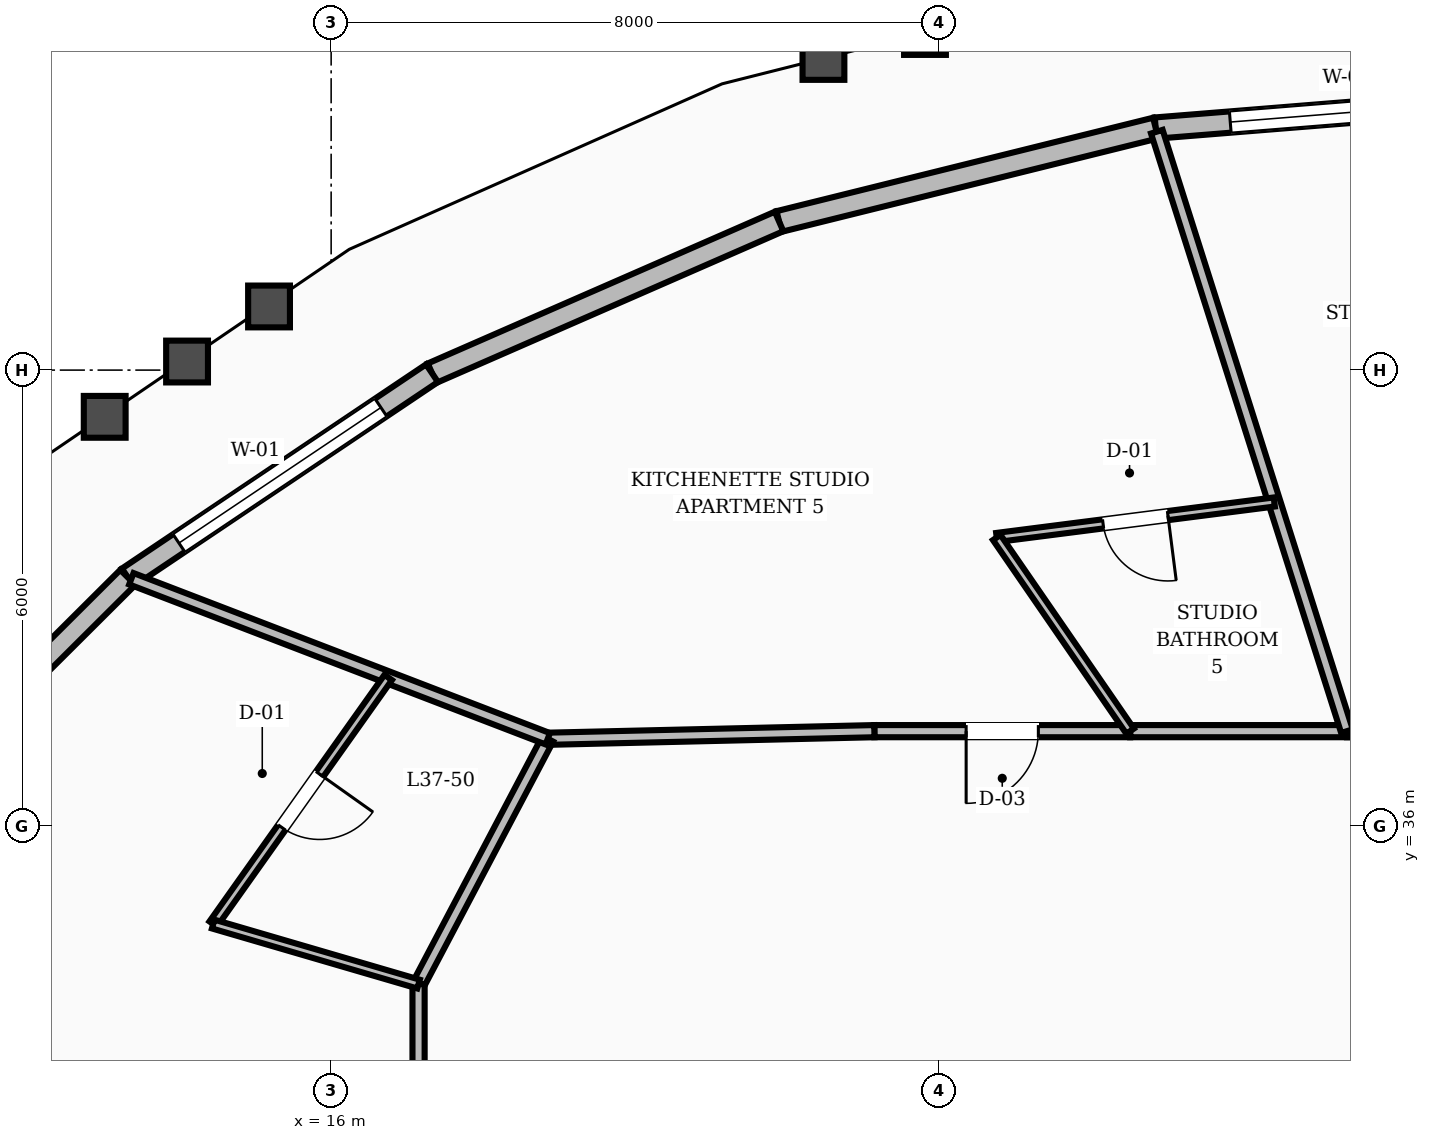
"""IFC4 building model, lengths in metres.
Left out: names, types, materials, properties, quantities, classifications, styles, units other than length and angle.
Written with IfcOpenShell. Run it as: python <this file> out.ifc"""

import sys

from ifc_helpers import new_model, si_unit, direction, frame, frame_2d, origin, place, context, subcontext, project, spatial, rectangle, extrude, element, fill, save


model = new_model("IFC4")
c1 = context("Model", 3, precision=1e-05, world=origin(), true_north=direction((0.0, 1.0)))
c2 = subcontext(c1, "Body", "Model", "MODEL_VIEW")
j1 = project(units=[si_unit("LENGTHUNIT", "METRE"), si_unit("PLANEANGLEUNIT", "RADIAN")], contexts=[c1])
p1 = place(None, origin())
s1 = spatial("IfcSite", under=j1, at=p1, CompositionType="ELEMENT")
p2 = place(p1, origin())
s2 = spatial("IfcBuilding", under=s1, at=p2, CompositionType="ELEMENT")
p3 = place(p2, frame((0.0, 0.0, 146.0)))
s3 = spatial("IfcBuildingStorey", under=s2, at=p3, CompositionType="ELEMENT", Elevation=146.0)
p4 = place(p3, frame((32.0, 45.599, 0.0), z_axis=(0.0, 0.0, 1.0), x_axis=(-0.996771275463, -0.080293364684, 0.0)))
e1 = element("IfcWall", 1, at=p4, inside=s3, PredefinedType="STANDARD", context=c2, shape_type="SweptSolid", body=[
    extrude(rectangle(XDim=5.169, YDim=0.28, at=frame_2d((2.584, 0.0))), origin(), (0.0, 0.0, 1.0), 2.82),
])
p5 = place(p4, frame((0.985, 0.0, 0.8)))
e2 = element("IfcOpeningElement", 2, at=p5, cuts=e1, PredefinedType="OPENING", context=c2, shape_type="SweptSolid", body=[
    extrude(rectangle(XDim=3.2, YDim=1.65, at=frame_2d((1.6, 0.825))), frame((0.0, 0.15, 0.0), z_axis=(0.0, -1.0, 0.0), x_axis=(1.0, 0.0, 0.0)), (0.0, 0.0, 1.0), 0.3),
])
p6 = place(p3, frame((26.848, 45.184, 0.0), z_axis=(0.0, 0.0, 1.0), x_axis=(-0.970574196652, -0.240802260774, 0.0)))
e3 = element("IfcWall", 3, at=p6, inside=s3, PredefinedType="STANDARD", context=c2, shape_type="SweptSolid", body=[
    extrude(rectangle(XDim=5.105, YDim=0.28, at=frame_2d((2.552, 0.0))), origin(), (0.0, 0.0, 1.0), 2.82),
])
p7 = place(p3, frame((21.893, 43.955, 0.0), z_axis=(0.0, 0.0, 1.0), x_axis=(-0.916285475586, -0.400525813438, 0.0)))
e4 = element("IfcWall", 4, at=p7, inside=s3, PredefinedType="STANDARD", context=c2, shape_type="SweptSolid", body=[
    extrude(rectangle(XDim=4.983, YDim=0.28, at=frame_2d((2.492, 0.0))), origin(), (0.0, 0.0, 1.0), 2.82),
])
p8 = place(p3, frame((17.327, 41.959, 0.0), z_axis=(0.0, 0.0, 1.0), x_axis=(-0.830308520581, -0.557304010977, 0.0)))
e5 = element("IfcWall", 5, at=p8, inside=s3, PredefinedType="STANDARD", context=c2, shape_type="SweptSolid", body=[
    extrude(rectangle(XDim=4.82, YDim=0.28, at=frame_2d((2.41, 0.0))), origin(), (0.0, 0.0, 1.0), 2.82),
])
p9 = place(p8, frame((0.81, 0.0, 0.8)))
e6 = element("IfcOpeningElement", 6, at=p9, cuts=e5, PredefinedType="OPENING", context=c2, shape_type="SweptSolid", body=[
    extrude(rectangle(XDim=3.2, YDim=1.65, at=frame_2d((1.6, 0.825))), frame((0.0, 0.15, 0.0), z_axis=(0.0, -1.0, 0.0), x_axis=(1.0, 0.0, 0.0)), (0.0, 0.0, 1.0), 0.3),
])
p10 = place(p3, frame((13.325, 39.273, 0.0), z_axis=(0.0, 0.0, 1.0), x_axis=(-0.708343047993, -0.70586834917, 0.0)))
e7 = element("IfcWall", 7, at=p10, inside=s3, PredefinedType="STANDARD", context=c2, shape_type="SweptSolid", body=[
    extrude(rectangle(XDim=4.637, YDim=0.28, at=frame_2d((2.318, 0.0))), origin(), (0.0, 0.0, 1.0), 2.82),
])
p11 = place(p3, frame((32.0, 37.25, 0.0), z_axis=(0.0, 0.0, 1.0), x_axis=(-1.0, 0.0, 0.0)))
e8 = element("IfcWall", 8, at=p11, inside=s3, PredefinedType="SOLIDWALL", context=c2, shape_type="SweptSolid", body=[
    extrude(rectangle(XDim=2.635, YDim=0.16, at=frame_2d((1.318, 0.0))), origin(), (0.0, 0.0, 1.0), 2.8),
])
p12 = place(p11, frame((0.843, 0.0, 0.0)))
e9 = element("IfcOpeningElement", 9, at=p12, cuts=e8, PredefinedType="OPENING", context=c2, shape_type="SweptSolid", body=[
    extrude(rectangle(XDim=0.95, YDim=2.1, at=frame_2d((0.475, 1.05))), frame((0.0, 0.09, 0.0), z_axis=(0.0, -1.0, 0.0), x_axis=(1.0, 0.0, 0.0)), (0.0, 0.0, 1.0), 0.18),
])
p13 = place(p3, frame((29.365, 37.25, 0.0), z_axis=(0.0, 0.0, 1.0), x_axis=(-1.0, 0.0, 0.0)))
e10 = element("IfcWall", 10, at=p13, inside=s3, PredefinedType="SOLIDWALL", context=c2, shape_type="SweptSolid", body=[
    extrude(rectangle(XDim=2.853, YDim=0.16, at=frame_2d((1.426, 0.0))), origin(), (0.0, 0.0, 1.0), 2.8),
])
p14 = place(p3, frame((26.512, 37.25, 0.0), z_axis=(0.0, 0.0, 1.0), x_axis=(-1.0, 0.0, 0.0)))
e11 = element("IfcWall", 11, at=p14, inside=s3, PredefinedType="SOLIDWALL", context=c2, shape_type="SweptSolid", body=[
    extrude(rectangle(XDim=3.365, YDim=0.16, at=frame_2d((1.683, 0.0))), origin(), (0.0, 0.0, 1.0), 2.8),
])
p15 = place(p14, frame((1.208, 0.0, 0.0)))
e12 = element("IfcOpeningElement", 12, at=p15, cuts=e11, PredefinedType="OPENING", context=c2, shape_type="SweptSolid", body=[
    extrude(rectangle(XDim=0.95, YDim=2.1, at=frame_2d((0.475, 1.05))), frame((0.0, 0.09, 0.0), z_axis=(0.0, -1.0, 0.0), x_axis=(1.0, 0.0, 0.0)), (0.0, 0.0, 1.0), 0.18),
])
p16 = place(p3, frame((23.146, 37.25, 0.0), z_axis=(0.0, 0.0, 1.0), x_axis=(-0.999728709658, -0.023291781507, 0.0)))
e13 = element("IfcWall", 13, at=p16, inside=s3, PredefinedType="SOLIDWALL", context=c2, shape_type="SweptSolid", body=[
    extrude(rectangle(XDim=4.298, YDim=0.16, at=frame_2d((2.149, 0.0))), origin(), (0.0, 0.0, 1.0), 2.8),
])
p17 = place(p3, frame((18.85, 37.15, 0.0), z_axis=(0.0, 0.0, 1.0), x_axis=(-0.466093963429, -0.884735224378, 0.0)))
e14 = element("IfcWall", 14, at=p17, inside=s3, PredefinedType="SOLIDWALL", context=c2, shape_type="SweptSolid", body=[
    extrude(rectangle(XDim=3.648, YDim=0.16, at=frame_2d((1.824, 0.0))), origin(), (0.0, 0.0, 1.0), 2.8),
])
p18 = place(p3, frame((17.15, 33.923, 0.0), z_axis=(0.0, 0.0, 1.0), x_axis=(0.0, -1.0, 0.0)))
e15 = element("IfcWall", 15, at=p18, inside=s3, PredefinedType="SOLIDWALL", context=c2, shape_type="SweptSolid", body=[
    extrude(rectangle(XDim=3.771, YDim=0.16, at=frame_2d((1.886, 0.0))), origin(), (0.0, 0.0, 1.0), 2.8),
])
p19 = place(p18, frame((1.411, 0.0, 0.0)))
e16 = element("IfcOpeningElement", 16, at=p19, cuts=e15, PredefinedType="OPENING", context=c2, shape_type="SweptSolid", body=[
    extrude(rectangle(XDim=0.95, YDim=2.1, at=frame_2d((0.475, 1.05))), frame((0.0, 0.09, 0.0), z_axis=(0.0, -1.0, 0.0), x_axis=(1.0, 0.0, 0.0)), (0.0, 0.0, 1.0), 0.18),
])
p20 = place(p3, frame((29.365, 37.25, 0.0), z_axis=(0.0, 0.0, 1.0), x_axis=(-0.302358297893, 0.953194345186, 0.0)))
e17 = element("IfcWall", 17, at=p20, inside=s3, PredefinedType="SOLIDWALL", context=c2, shape_type="SweptSolid", body=[
    extrude(rectangle(XDim=8.274, YDim=0.16, at=frame_2d((4.137, 0.0))), origin(), (0.0, 0.0, 1.0), 2.8),
])
p21 = place(p3, frame((28.408, 40.265, 0.0), z_axis=(0.0, 0.0, 1.0), x_axis=(-0.991927075006, -0.126809612691, 0.0)))
e18 = element("IfcWall", 18, at=p21, inside=s3, PredefinedType="PARTITIONING", context=c2, shape_type="SweptSolid", body=[
    extrude(rectangle(XDim=3.681, YDim=0.12, at=frame_2d((1.841, 0.0))), origin(), (0.0, 0.0, 1.0), 2.8),
])
p22 = place(p21, frame((1.41, 0.0, 0.0)))
e19 = element("IfcOpeningElement", 19, at=p22, cuts=e18, PredefinedType="OPENING", context=c2, shape_type="SweptSolid", body=[
    extrude(rectangle(XDim=0.86, YDim=2.1, at=frame_2d((0.43, 1.05))), frame((0.0, 0.07, 0.0), z_axis=(0.0, -1.0, 0.0), x_axis=(1.0, 0.0, 0.0)), (0.0, 0.0, 1.0), 0.14),
])
p23 = place(p3, frame((26.512, 37.25, 0.0), z_axis=(0.0, 0.0, 1.0), x_axis=(-0.567255291352, 0.823542005263, 0.0)))
e20 = element("IfcWall", 20, at=p23, inside=s3, PredefinedType="PARTITIONING", context=c2, shape_type="SweptSolid", body=[
    extrude(rectangle(XDim=3.094, YDim=0.12, at=frame_2d((1.547, 0.0))), origin(), (0.0, 0.0, 1.0), 2.8),
])
p24 = place(p3, frame((18.85, 37.15, 0.0), z_axis=(0.0, 0.0, 1.0), x_axis=(-0.933453846584, 0.358697527589, 0.0)))
e21 = element("IfcWall", 21, at=p24, inside=s3, PredefinedType="SOLIDWALL", context=c2, shape_type="SweptSolid", body=[
    extrude(rectangle(XDim=5.869, YDim=0.16, at=frame_2d((2.935, 0.0))), origin(), (0.0, 0.0, 1.0), 2.8),
])
p25 = place(p3, frame((16.75, 37.957, 0.0), z_axis=(0.0, 0.0, 1.0), x_axis=(-0.57861140021, -0.81560336411, 0.0)))
e22 = element("IfcWall", 22, at=p25, inside=s3, PredefinedType="PARTITIONING", context=c2, shape_type="SweptSolid", body=[
    extrude(rectangle(XDim=3.979, YDim=0.12, at=frame_2d((1.989, 0.0))), origin(), (0.0, 0.0, 1.0), 2.8),
])
p26 = place(p25, frame((1.559, 0.0, 0.0)))
e23 = element("IfcOpeningElement", 23, at=p26, cuts=e22, PredefinedType="OPENING", context=c2, shape_type="SweptSolid", body=[
    extrude(rectangle(XDim=0.86, YDim=2.1, at=frame_2d((0.43, 1.05))), frame((0.0, 0.07, 0.0), z_axis=(0.0, -1.0, 0.0), x_axis=(1.0, 0.0, 0.0)), (0.0, 0.0, 1.0), 0.14),
])
p27 = place(p3, frame((17.15, 33.923, 0.0), z_axis=(0.0, 0.0, 1.0), x_axis=(-0.959866785373, 0.280456332319, 0.0)))
e24 = element("IfcWall", 24, at=p27, inside=s3, PredefinedType="PARTITIONING", context=c2, shape_type="SweptSolid", body=[
    extrude(rectangle(XDim=2.814, YDim=0.12, at=frame_2d((1.407, 0.0))), origin(), (0.0, 0.0, 1.0), 2.8),
])
p28 = place(p5, origin())
e25 = element("IfcWindow", 25, at=p28, inside=s3, PartitioningType="SINGLE_PANEL", PredefinedType="WINDOW", context=c2, shape_type="SweptSolid", body=[
    extrude(rectangle(XDim=3.2, YDim=1.65, at=frame_2d((1.6, 0.825))), frame((0.0, 0.03, 0.0), z_axis=(0.0, -1.0, 0.0), x_axis=(1.0, 0.0, 0.0)), (0.0, 0.0, 1.0), 0.06),
])
fill(e2, e25)
p29 = place(p9, origin())
e26 = element("IfcWindow", 26, at=p29, inside=s3, PartitioningType="SINGLE_PANEL", PredefinedType="WINDOW", context=c2, shape_type="SweptSolid", body=[
    extrude(rectangle(XDim=3.2, YDim=1.65, at=frame_2d((1.6, 0.825))), frame((0.0, 0.03, 0.0), z_axis=(0.0, -1.0, 0.0), x_axis=(1.0, 0.0, 0.0)), (0.0, 0.0, 1.0), 0.06),
])
fill(e6, e26)
p30 = place(p22, origin())
e27 = element("IfcDoor", 27, at=p30, inside=s3, OperationType="SINGLE_SWING_LEFT", PredefinedType="DOOR", context=c2, shape_type="SweptSolid", body=[
    extrude(rectangle(XDim=0.86, YDim=2.1, at=frame_2d((0.43, 1.05))), frame((0.0, 0.025, 0.0), z_axis=(0.0, -1.0, 0.0), x_axis=(1.0, 0.0, 0.0)), (0.0, 0.0, 1.0), 0.05),
])
fill(e19, e27)
p31 = place(p15, origin())
e28 = element("IfcDoor", 28, at=p31, inside=s3, OperationType="SINGLE_SWING_RIGHT", PredefinedType="DOOR", context=c2, shape_type="SweptSolid", body=[
    extrude(rectangle(XDim=0.95, YDim=2.1, at=frame_2d((0.475, 1.05))), frame((0.0, 0.025, 0.0), z_axis=(0.0, -1.0, 0.0), x_axis=(1.0, 0.0, 0.0)), (0.0, 0.0, 1.0), 0.05),
])
fill(e12, e28)
p32 = place(p26, origin())
e29 = element("IfcDoor", 29, at=p32, inside=s3, OperationType="SINGLE_SWING_LEFT", PredefinedType="DOOR", context=c2, shape_type="SweptSolid", body=[
    extrude(rectangle(XDim=0.86, YDim=2.1, at=frame_2d((0.43, 1.05))), frame((0.0, 0.025, 0.0), z_axis=(0.0, -1.0, 0.0), x_axis=(1.0, 0.0, 0.0)), (0.0, 0.0, 1.0), 0.05),
])
fill(e23, e29)
save(model, sys.argv[1])
